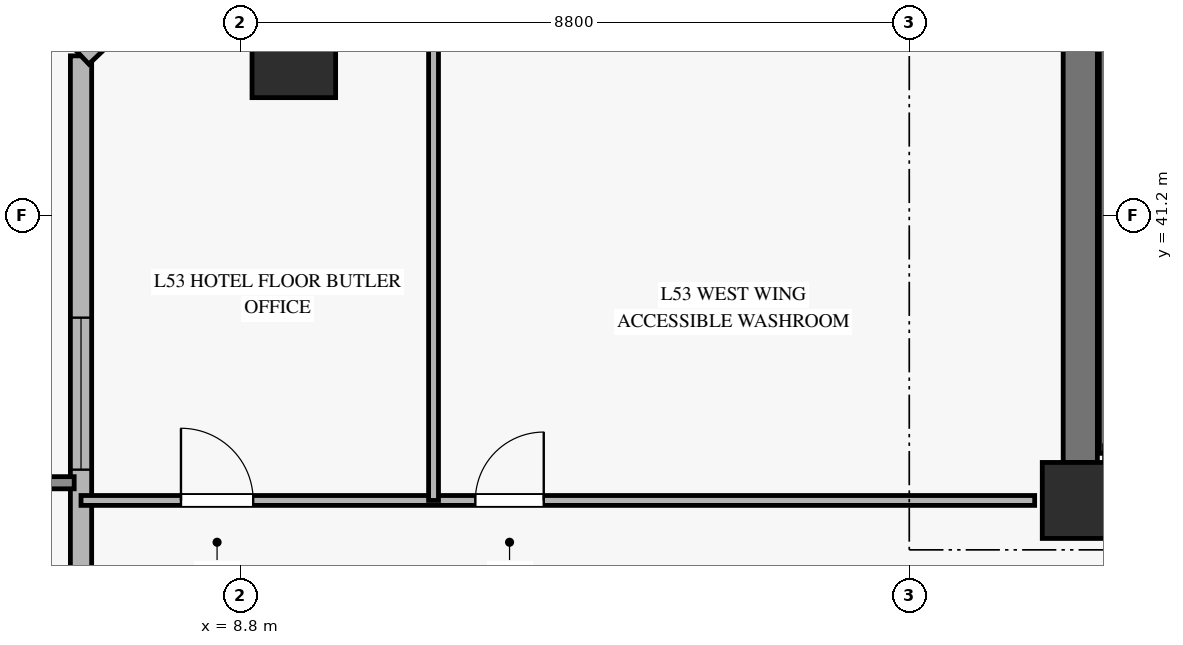
"""IFC4 building model, lengths in metres.
Left out: names, types, materials, properties, quantities, classifications, styles, units other than length and angle.
Written with IfcOpenShell. Run it as: python <this file> out.ifc"""

import sys

from ifc_helpers import new_model, si_unit, direction, frame, frame_2d, origin, origin_2d, place, context, subcontext, project, spatial, rectangle, hollow_rectangle, extrude, source, transform, mapped, element, fill, save


model = new_model("IFC4")
c1 = context("Model", 3, precision=1e-05, world=origin(), true_north=direction((0.0, 1.0)))
c2 = subcontext(c1, "Body", "Model", "MODEL_VIEW")
j1 = project(units=[si_unit("LENGTHUNIT", "METRE"), si_unit("PLANEANGLEUNIT", "RADIAN")], contexts=[c1])
p1 = place(None, origin())
s1 = spatial("IfcSite", under=j1, at=p1, CompositionType="ELEMENT")
p2 = place(p1, origin())
s2 = spatial("IfcBuilding", under=s1, at=p2, CompositionType="ELEMENT")
p3 = place(p2, frame((0.0, 0.0, 209.7)))
s3 = spatial("IfcBuildingStorey", under=s2, at=p3, CompositionType="ELEMENT", Elevation=209.7)
m1 = source(origin(), c2, "Body", "SweptSolid", [
    extrude(rectangle(XDim=1.0, YDim=1.0, at=origin_2d()), origin(), (0.0, 0.0, 1.0), 3.27),
])
p4 = place(p3, frame((19.85, 37.45, 0.0), z_axis=(0.0, 0.0, 1.0), x_axis=(1.0, 0.0, 0.0)))
e1 = element("IfcColumn", 1, at=p4, inside=s3, PredefinedType="PILASTER", context=c2, shape_type="MappedRepresentation", body=[
    mapped(m1, transform((0.0, 0.0, 0.0), x_axis=(1.0, 0.0, 0.0), y_axis=(0.0, 1.0, 0.0), z_axis=(0.0, 0.0, 1.0), scale=1.0)),
])
p5 = place(p3, frame((19.85, 37.95, 0.0), z_axis=(0.0, 0.0, 1.0), x_axis=(0.0, 1.0, 0.0)))
e2 = element("IfcWall", 2, at=p5, inside=s3, PredefinedType="SHEAR", context=c2, shape_type="SweptSolid", body=[
    extrude(rectangle(XDim=8.1, YDim=0.45, at=frame_2d((4.05, 0.0))), origin(), (0.0, 0.0, 1.0), 3.27),
])
m2 = source(origin(), c2, "Body", "SweptSolid", [
    extrude(hollow_rectangle(XDim=1.1, YDim=1.1, WallThickness=0.05, at=origin_2d()), origin(), (0.0, 0.0, 1.0), 3.291),
])
p6 = place(p3, frame((9.503, 43.3, 0.0), z_axis=(0.112162985844, 0.013946191362, 0.993591952641), x_axis=(-0.123388483821, 0.992358444344, 0.0)))
e3 = element("IfcColumn", 3, at=p6, inside=s3, PredefinedType="COLUMN", context=c2, shape_type="MappedRepresentation", body=[
    mapped(m2, transform((0.0, 0.0, 0.0), x_axis=(1.0, 0.0, 0.0), y_axis=(0.0, 1.0, 0.0), z_axis=(0.0, 0.0, 1.0), scale=1.0)),
])
p7 = place(p3, frame((6.703, 29.043, 0.0), z_axis=(0.0, 0.0, 1.0), x_axis=(0.0, 1.0, 0.0)))
e4 = element("IfcWall", 4, at=p7, inside=s3, PredefinedType="SOLIDWALL", context=c2, shape_type="SweptSolid", body=[
    extrude(rectangle(XDim=14.257, YDim=0.28, at=frame_2d((7.128, 0.0))), origin(), (0.0, 0.0, 1.0), 2.75),
])
p8 = place(p7, frame((8.812, 0.0, 0.45)))
e5 = element("IfcOpeningElement", 5, at=p8, cuts=e4, PredefinedType="OPENING", context=c2, shape_type="SweptSolid", body=[
    extrude(rectangle(XDim=2.0, YDim=2.0, at=frame_2d((1.0, 1.0))), frame((0.0, 0.15, 0.0), z_axis=(0.0, -1.0, 0.0), x_axis=(1.0, 0.0, 0.0)), (0.0, 0.0, 1.0), 0.3),
])
p9 = place(p3, frame((9.803, 46.25, 0.0), z_axis=(0.0, 0.0, 1.0), x_axis=(-0.724432277522, -0.689345976476, 0.0)))
e6 = element("IfcWall", 6, at=p9, inside=s3, PredefinedType="SOLIDWALL", context=c2, shape_type="SweptSolid", body=[
    extrude(rectangle(XDim=4.279, YDim=0.3, at=frame_2d((2.14, 0.0))), origin(), (0.0, 0.0, 1.0), 2.75),
])
p10 = place(p9, frame((1.34, 0.0, 0.45)))
e7 = element("IfcOpeningElement", 7, at=p10, cuts=e6, PredefinedType="OPENING", context=c2, shape_type="SweptSolid", body=[
    extrude(rectangle(XDim=1.6, YDim=2.0, at=frame_2d((0.8, 1.0))), frame((0.0, 0.16, 0.0), z_axis=(0.0, -1.0, 0.0), x_axis=(1.0, 0.0, 0.0)), (0.0, 0.0, 1.0), 0.32),
])
p11 = place(p3, frame((20.17, 38.07, 0.0), z_axis=(0.0, 0.0, 1.0), x_axis=(0.0, 1.0, 0.0)))
e8 = element("IfcWall", 8, at=p11, inside=s3, PredefinedType="SOLIDWALL", context=c2, shape_type="SweptSolid", body=[
    extrude(rectangle(XDim=7.25, YDim=0.14, at=frame_2d((3.625, 0.0))), origin(), (0.0, 0.0, 1.0), 3.5),
])
p12 = place(p3, frame((6.703, 37.45, 0.0), z_axis=(0.0, 0.0, 1.0), x_axis=(1.0, 0.0, 0.0)))
e9 = element("IfcWall", 9, at=p12, inside=s3, PredefinedType="PARTITIONING", context=c2, shape_type="SweptSolid", body=[
    extrude(rectangle(XDim=12.547, YDim=0.13, at=frame_2d((6.273, 0.0))), origin(), (0.0, 0.0, 1.0), 2.755),
])
p13 = place(p12, frame((1.315, 0.0, 0.0)))
e10 = element("IfcOpeningElement", 10, at=p13, cuts=e9, PredefinedType="OPENING", context=c2, shape_type="SweptSolid", body=[
    extrude(rectangle(XDim=0.95, YDim=2.1, at=frame_2d((0.475, 1.05))), frame((0.0, 0.075, 0.0), z_axis=(0.0, -1.0, 0.0), x_axis=(1.0, 0.0, 0.0)), (0.0, 0.0, 1.0), 0.15),
])
p14 = place(p12, frame((5.188, 0.0, 0.0)))
e11 = element("IfcOpeningElement", 11, at=p14, cuts=e9, PredefinedType="OPENING", context=c2, shape_type="SweptSolid", body=[
    extrude(rectangle(XDim=0.9, YDim=2.1, at=frame_2d((0.45, 1.05))), frame((0.0, 0.075, 0.0), z_axis=(0.0, -1.0, 0.0), x_axis=(1.0, 0.0, 0.0)), (0.0, 0.0, 1.0), 0.15),
])
p15 = place(p3, frame((11.341, 37.45, 0.0), z_axis=(0.0, 0.0, 1.0), x_axis=(0.0, 1.0, 0.0)))
e12 = element("IfcWall", 12, at=p15, inside=s3, PredefinedType="PARTITIONING", context=c2, shape_type="SweptSolid", body=[
    extrude(rectangle(XDim=8.8, YDim=0.13, at=frame_2d((4.4, 0.0))), origin(), (0.0, 0.0, 1.0), 3.27),
])
m3 = source(origin(), c2, "Body", "SweptSolid", [
    extrude(rectangle(XDim=2.0, YDim=2.0, at=frame_2d((1.0, 1.0))), frame((0.0, 0.03, 0.0), z_axis=(0.0, -1.0, 0.0), x_axis=(1.0, 0.0, 0.0)), (0.0, 0.0, 1.0), 0.06),
])
p16 = place(p8, origin())
e13 = element("IfcWindow", 13, at=p16, inside=s3, PartitioningType="SINGLE_PANEL", PredefinedType="WINDOW", context=c2, shape_type="MappedRepresentation", body=[
    mapped(m3, transform((0.0, 0.0, 0.0), x_axis=(1.0, 0.0, 0.0), y_axis=(0.0, 1.0, 0.0), z_axis=(0.0, 0.0, 1.0), scale=1.0)),
])
fill(e5, e13)
m4 = source(origin(), c2, "Body", "SweptSolid", [
    extrude(rectangle(XDim=0.95, YDim=2.1, at=frame_2d((0.475, 1.05))), frame((0.0, 0.025, 0.0), z_axis=(0.0, -1.0, 0.0), x_axis=(1.0, 0.0, 0.0)), (0.0, 0.0, 1.0), 0.05),
])
p17 = place(p13, origin())
e14 = element("IfcDoor", 14, at=p17, inside=s3, OperationType="SINGLE_SWING_LEFT", PredefinedType="DOOR", context=c2, shape_type="MappedRepresentation", body=[
    mapped(m4, transform((0.0, 0.0, 0.0), x_axis=(1.0, 0.0, 0.0), y_axis=(0.0, 1.0, 0.0), z_axis=(0.0, 0.0, 1.0), scale=1.0)),
])
fill(e10, e14)
m5 = source(origin(), c2, "Body", "SweptSolid", [
    extrude(rectangle(XDim=0.9, YDim=2.1, at=frame_2d((0.45, 1.05))), frame((0.0, 0.025, 0.0), z_axis=(0.0, -1.0, 0.0), x_axis=(1.0, 0.0, 0.0)), (0.0, 0.0, 1.0), 0.05),
])
p18 = place(p14, origin())
e15 = element("IfcDoor", 15, at=p18, inside=s3, OperationType="SINGLE_SWING_RIGHT", PredefinedType="DOOR", context=c2, shape_type="MappedRepresentation", body=[
    mapped(m5, transform((0.0, 0.0, 0.0), x_axis=(1.0, 0.0, 0.0), y_axis=(0.0, 1.0, 0.0), z_axis=(0.0, 0.0, 1.0), scale=1.0)),
])
fill(e11, e15)
save(model, sys.argv[1])
